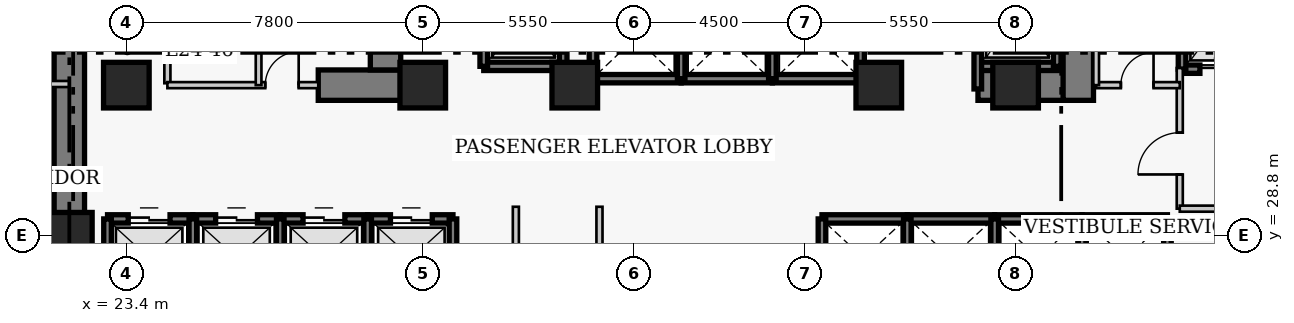
"""IFC4 building model, lengths in metres.
Left out: names, types, materials, properties, quantities, classifications, styles, units other than length and angle.
Written with IfcOpenShell. Run it as: python <this file> out.ifc"""

import sys

from ifc_helpers import new_model, si_unit, direction, frame, frame_2d, origin, origin_2d, place, context, subcontext, project, spatial, rectangle, extrude, element, fill, save


model = new_model("IFC4")
c1 = context("Model", 3, precision=1e-05, world=origin(), true_north=direction((0.0, 1.0)))
c2 = subcontext(c1, "Body", "Model", "MODEL_VIEW")
j1 = project(units=[si_unit("LENGTHUNIT", "METRE"), si_unit("PLANEANGLEUNIT", "RADIAN")], contexts=[c1])
p1 = place(None, origin())
s1 = spatial("IfcSite", under=j1, at=p1, CompositionType="ELEMENT")
p2 = place(p1, origin())
s2 = spatial("IfcBuilding", under=s1, at=p2, CompositionType="ELEMENT")
p3 = place(p2, frame((0.0, 0.0, 99.4)))
s3 = spatial("IfcBuildingStorey", under=s2, at=p3, CompositionType="ELEMENT", Elevation=99.4)
p4 = place(p3, frame((21.9, 27.05, 0.0), z_axis=(0.0, 0.0, 1.0), x_axis=(0.0, 1.0, 0.0)))
e1 = element("IfcWall", 1, at=p4, inside=s3, PredefinedType="SHEAR", context=c2, shape_type="SweptSolid", body=[
    extrude(rectangle(XDim=13.67, YDim=0.8, at=frame_2d((6.835, 0.0))), origin(), (0.0, 0.0, 1.0), 3.8),
])
p5 = place(p3, frame((28.45, 32.75, 0.0), z_axis=(0.0, 0.0, 1.0), x_axis=(1.0, 0.0, 0.0)))
e2 = element("IfcWall", 2, at=p5, inside=s3, PredefinedType="SHEAR", context=c2, shape_type="SweptSolid", body=[
    extrude(rectangle(XDim=2.4, YDim=0.8, at=frame_2d((1.2, 0.0))), origin(), (0.0, 0.0, 1.0), 3.8),
])
p6 = place(p3, frame((45.81, 32.75, 0.0), z_axis=(0.0, 0.0, 1.0), x_axis=(1.0, 0.0, 0.0)))
e3 = element("IfcWall", 3, at=p6, inside=s3, PredefinedType="SHEAR", context=c2, shape_type="SweptSolid", body=[
    extrude(rectangle(XDim=2.64, YDim=0.8, at=frame_2d((1.32, 0.0))), origin(), (0.0, 0.0, 1.0), 3.8),
])
p7 = place(p3, frame((30.22, 33.15, 0.0), z_axis=(0.0, 0.0, 1.0), x_axis=(0.0, 1.0, 0.0)))
e4 = element("IfcWall", 4, at=p7, inside=s3, PredefinedType="SHEAR", context=c2, shape_type="SweptSolid", body=[
    extrude(rectangle(XDim=7.17, YDim=0.8, at=frame_2d((3.585, 0.0))), origin(), (0.0, 0.0, 1.0), 3.8),
])
p8 = place(p3, frame((48.45, 32.35, 0.0), z_axis=(0.0, 0.0, 1.0), x_axis=(0.0, 1.0, 0.0)))
e5 = element("IfcWall", 5, at=p8, inside=s3, PredefinedType="SHEAR", context=c2, shape_type="SweptSolid", body=[
    extrude(rectangle(XDim=7.97, YDim=0.8, at=frame_2d((3.985, 0.0))), origin(), (0.0, 0.0, 1.0), 3.8),
])
p9 = place(p8, frame((5.85, 0.0, 0.0)))
e6 = element("IfcOpeningElement", 6, at=p9, cuts=e5, PredefinedType="OPENING", context=c2, shape_type="SweptSolid", body=[
    extrude(rectangle(XDim=1.1, YDim=2.15, at=frame_2d((0.55, 1.075))), frame((0.0, 0.41, 0.0), z_axis=(0.0, -1.0, 0.0), x_axis=(1.0, 0.0, 0.0)), (0.0, 0.0, 1.0), 0.82),
])
for number, where, z_axis, x_axis in (
    (7, (21.9, 28.8, 0.0), (0.0, 0.0, 1.0), (1.0, 0.0, 0.0)),
    (8, (23.4, 32.75, 0.0), (0.0, 0.0, 1.0), (1.0, 0.0, 0.0)),
    (9, (31.2, 32.75, 0.0), (0.0, 0.0, 1.0), (1.0, 0.0, 0.0)),
    (10, (35.2, 32.75, 0.0), (0.0, 0.0, 1.0), (1.0, 0.0, 0.0)),
    (11, (43.2, 32.75, 0.0), (0.0, 0.0, 1.0), (1.0, 0.0, 0.0)),
    (12, (46.8, 32.75, 0.0), (0.0, 0.0, 1.0), (1.0, 0.0, 0.0)),
):
    element("IfcColumn", number, at=place(p3, frame(where, z_axis=z_axis, x_axis=x_axis)), inside=s3, PredefinedType="COLUMN", context=c2, shape_type="SweptSolid", body=[
        extrude(rectangle(XDim=1.2, YDim=1.2, at=origin_2d()), origin(), (0.0, 0.0, 1.0), 3.8),
    ])
p10 = place(p3, frame((22.905, 29.23, 0.0), z_axis=(0.0, 0.0, 1.0), x_axis=(1.0, 0.0, 0.0)))
e13 = element("IfcWall", 13, at=p10, inside=s3, PredefinedType="SHEAR", context=c2, shape_type="SweptSolid", body=[
    extrude(rectangle(XDim=2.245, YDim=0.22, at=frame_2d((1.123, 0.0))), origin(), (0.0, 0.0, 1.0), 3.8),
])
p11 = place(p10, frame((0.545, 0.0, 0.0)))
e14 = element("IfcOpeningElement", 14, at=p11, cuts=e13, PredefinedType="OPENING", context=c2, shape_type="SweptSolid", body=[
    extrude(rectangle(XDim=1.1, YDim=2.15, at=frame_2d((0.55, 1.075))), frame((0.0, 0.12, 0.0), z_axis=(0.0, -1.0, 0.0), x_axis=(1.0, 0.0, 0.0)), (0.0, 0.0, 1.0), 0.24),
])
p12 = place(p3, frame((22.905, 27.17, 0.0), z_axis=(0.0, 0.0, 1.0), x_axis=(0.0, 1.0, 0.0)))
e15 = element("IfcWall", 15, at=p12, inside=s3, PredefinedType="SHEAR", context=c2, shape_type="SweptSolid", body=[
    extrude(rectangle(XDim=2.06, YDim=0.2, at=frame_2d((1.03, 0.0))), origin(), (0.0, 0.0, 1.0), 3.8),
])
p13 = place(p3, frame((25.15, 29.23, 0.0), z_axis=(0.0, 0.0, 1.0), x_axis=(1.0, 0.0, 0.0)))
e16 = element("IfcWall", 16, at=p13, inside=s3, PredefinedType="SHEAR", context=c2, shape_type="SweptSolid", body=[
    extrude(rectangle(XDim=2.3, YDim=0.22, at=frame_2d((1.15, 0.0))), origin(), (0.0, 0.0, 1.0), 3.8),
])
p14 = place(p13, frame((0.6, 0.0, 0.0)))
e17 = element("IfcOpeningElement", 17, at=p14, cuts=e16, PredefinedType="OPENING", context=c2, shape_type="SweptSolid", body=[
    extrude(rectangle(XDim=1.1, YDim=2.15, at=frame_2d((0.55, 1.075))), frame((0.0, 0.12, 0.0), z_axis=(0.0, -1.0, 0.0), x_axis=(1.0, 0.0, 0.0)), (0.0, 0.0, 1.0), 0.24),
])
p15 = place(p3, frame((25.15, 27.17, 0.0), z_axis=(0.0, 0.0, 1.0), x_axis=(0.0, 1.0, 0.0)))
e18 = element("IfcWall", 18, at=p15, inside=s3, PredefinedType="SHEAR", context=c2, shape_type="SweptSolid", body=[
    extrude(rectangle(XDim=2.06, YDim=0.2, at=frame_2d((1.03, 0.0))), origin(), (0.0, 0.0, 1.0), 3.8),
])
p16 = place(p3, frame((27.45, 29.23, 0.0), z_axis=(0.0, 0.0, 1.0), x_axis=(1.0, 0.0, 0.0)))
e19 = element("IfcWall", 19, at=p16, inside=s3, PredefinedType="SHEAR", context=c2, shape_type="SweptSolid", body=[
    extrude(rectangle(XDim=2.3, YDim=0.22, at=frame_2d((1.15, 0.0))), origin(), (0.0, 0.0, 1.0), 3.8),
])
p17 = place(p16, frame((0.6, 0.0, 0.0)))
e20 = element("IfcOpeningElement", 20, at=p17, cuts=e19, PredefinedType="OPENING", context=c2, shape_type="SweptSolid", body=[
    extrude(rectangle(XDim=1.1, YDim=2.15, at=frame_2d((0.55, 1.075))), frame((0.0, 0.12, 0.0), z_axis=(0.0, -1.0, 0.0), x_axis=(1.0, 0.0, 0.0)), (0.0, 0.0, 1.0), 0.24),
])
p18 = place(p3, frame((27.45, 27.17, 0.0), z_axis=(0.0, 0.0, 1.0), x_axis=(0.0, 1.0, 0.0)))
e21 = element("IfcWall", 21, at=p18, inside=s3, PredefinedType="SHEAR", context=c2, shape_type="SweptSolid", body=[
    extrude(rectangle(XDim=2.06, YDim=0.2, at=frame_2d((1.03, 0.0))), origin(), (0.0, 0.0, 1.0), 3.8),
])
p19 = place(p3, frame((29.75, 29.23, 0.0), z_axis=(0.0, 0.0, 1.0), x_axis=(1.0, 0.0, 0.0)))
e22 = element("IfcWall", 22, at=p19, inside=s3, PredefinedType="SHEAR", context=c2, shape_type="SweptSolid", body=[
    extrude(rectangle(XDim=2.245, YDim=0.22, at=frame_2d((1.123, 0.0))), origin(), (0.0, 0.0, 1.0), 3.8),
])
p20 = place(p19, frame((0.6, 0.0, 0.0)))
e23 = element("IfcOpeningElement", 23, at=p20, cuts=e22, PredefinedType="OPENING", context=c2, shape_type="SweptSolid", body=[
    extrude(rectangle(XDim=1.1, YDim=2.15, at=frame_2d((0.55, 1.075))), frame((0.0, 0.12, 0.0), z_axis=(0.0, -1.0, 0.0), x_axis=(1.0, 0.0, 0.0)), (0.0, 0.0, 1.0), 0.24),
])
for number, where, z_axis, x_axis in (
    (24, (29.75, 27.17, 0.0), (0.0, 0.0, 1.0), (0.0, 1.0, 0.0)),
    (25, (31.995, 27.17, 0.0), (0.0, 0.0, 1.0), (0.0, 1.0, 0.0)),
):
    element("IfcWall", number, at=place(p3, frame(where, z_axis=z_axis, x_axis=x_axis)), inside=s3, PredefinedType="SHEAR", context=c2, shape_type="SweptSolid", body=[
        extrude(rectangle(XDim=2.06, YDim=0.2, at=frame_2d((1.03, 0.0))), origin(), (0.0, 0.0, 1.0), 3.8),
    ])
p21 = place(p3, frame((41.705, 29.23, 0.0), z_axis=(0.0, 0.0, 1.0), x_axis=(1.0, 0.0, 0.0)))
e26 = element("IfcWall", 26, at=p21, inside=s3, PredefinedType="SHEAR", context=c2, shape_type="SweptSolid", body=[
    extrude(rectangle(XDim=2.245, YDim=0.22, at=frame_2d((1.123, 0.0))), origin(), (0.0, 0.0, 1.0), 3.8),
])
p22 = place(p3, frame((41.705, 27.17, 0.0), z_axis=(0.0, 0.0, 1.0), x_axis=(0.0, 1.0, 0.0)))
e27 = element("IfcWall", 27, at=p22, inside=s3, PredefinedType="SHEAR", context=c2, shape_type="SweptSolid", body=[
    extrude(rectangle(XDim=2.06, YDim=0.2, at=frame_2d((1.03, 0.0))), origin(), (0.0, 0.0, 1.0), 3.8),
])
p23 = place(p3, frame((43.95, 29.23, 0.0), z_axis=(0.0, 0.0, 1.0), x_axis=(1.0, 0.0, 0.0)))
e28 = element("IfcWall", 28, at=p23, inside=s3, PredefinedType="SHEAR", context=c2, shape_type="SweptSolid", body=[
    extrude(rectangle(XDim=2.3, YDim=0.22, at=frame_2d((1.15, 0.0))), origin(), (0.0, 0.0, 1.0), 3.8),
])
p24 = place(p3, frame((43.95, 27.17, 0.0), z_axis=(0.0, 0.0, 1.0), x_axis=(0.0, 1.0, 0.0)))
e29 = element("IfcWall", 29, at=p24, inside=s3, PredefinedType="SHEAR", context=c2, shape_type="SweptSolid", body=[
    extrude(rectangle(XDim=2.06, YDim=0.2, at=frame_2d((1.03, 0.0))), origin(), (0.0, 0.0, 1.0), 3.8),
])
p25 = place(p3, frame((46.25, 29.23, 0.0), z_axis=(0.0, 0.0, 1.0), x_axis=(1.0, 0.0, 0.0)))
e30 = element("IfcWall", 30, at=p25, inside=s3, PredefinedType="SHEAR", context=c2, shape_type="SweptSolid", body=[
    extrude(rectangle(XDim=2.3, YDim=0.22, at=frame_2d((1.15, 0.0))), origin(), (0.0, 0.0, 1.0), 3.8),
])
p26 = place(p3, frame((46.25, 27.17, 0.0), z_axis=(0.0, 0.0, 1.0), x_axis=(0.0, 1.0, 0.0)))
e31 = element("IfcWall", 31, at=p26, inside=s3, PredefinedType="SHEAR", context=c2, shape_type="SweptSolid", body=[
    extrude(rectangle(XDim=2.06, YDim=0.2, at=frame_2d((1.03, 0.0))), origin(), (0.0, 0.0, 1.0), 3.8),
])
p27 = place(p3, frame((48.55, 29.23, 0.0), z_axis=(0.0, 0.0, 1.0), x_axis=(1.0, 0.0, 0.0)))
e32 = element("IfcWall", 32, at=p27, inside=s3, PredefinedType="SHEAR", context=c2, shape_type="SweptSolid", body=[
    extrude(rectangle(XDim=2.245, YDim=0.22, at=frame_2d((1.123, 0.0))), origin(), (0.0, 0.0, 1.0), 3.8),
])
for number, where, z_axis, x_axis in (
    (33, (48.55, 27.17, 0.0), (0.0, 0.0, 1.0), (0.0, 1.0, 0.0)),
    (34, (50.795, 27.17, 0.0), (0.0, 0.0, 1.0), (0.0, 1.0, 0.0)),
):
    element("IfcWall", number, at=place(p3, frame(where, z_axis=z_axis, x_axis=x_axis)), inside=s3, PredefinedType="SHEAR", context=c2, shape_type="SweptSolid", body=[
        extrude(rectangle(XDim=2.06, YDim=0.2, at=frame_2d((1.03, 0.0))), origin(), (0.0, 0.0, 1.0), 3.8),
    ])
p28 = place(p3, frame((35.68, 32.92, 0.0), z_axis=(0.0, 0.0, 1.0), x_axis=(1.0, 0.0, 0.0)))
e35 = element("IfcWall", 35, at=p28, inside=s3, PredefinedType="SHEAR", context=c2, shape_type="SweptSolid", body=[
    extrude(rectangle(XDim=2.32, YDim=0.22, at=frame_2d((1.16, 0.0))), origin(), (0.0, 0.0, 1.0), 3.8),
])
p29 = place(p3, frame((35.68, 32.92, 0.0), z_axis=(0.0, 0.0, 1.0), x_axis=(0.0, 1.0, 0.0)))
e36 = element("IfcWall", 36, at=p29, inside=s3, PredefinedType="SHEAR", context=c2, shape_type="SweptSolid", body=[
    extrude(rectangle(XDim=2.16, YDim=0.2, at=frame_2d((1.08, 0.0))), origin(), (0.0, 0.0, 1.0), 3.8),
])
p30 = place(p3, frame((38.0, 32.92, 0.0), z_axis=(0.0, 0.0, 1.0), x_axis=(1.0, 0.0, 0.0)))
e37 = element("IfcWall", 37, at=p30, inside=s3, PredefinedType="SHEAR", context=c2, shape_type="SweptSolid", body=[
    extrude(rectangle(XDim=2.4, YDim=0.22, at=frame_2d((1.2, 0.0))), origin(), (0.0, 0.0, 1.0), 3.8),
])
p31 = place(p3, frame((38.0, 32.92, 0.0), z_axis=(0.0, 0.0, 1.0), x_axis=(0.0, 1.0, 0.0)))
e38 = element("IfcWall", 38, at=p31, inside=s3, PredefinedType="SHEAR", context=c2, shape_type="SweptSolid", body=[
    extrude(rectangle(XDim=2.16, YDim=0.2, at=frame_2d((1.08, 0.0))), origin(), (0.0, 0.0, 1.0), 3.8),
])
p32 = place(p3, frame((40.4, 32.92, 0.0), z_axis=(0.0, 0.0, 1.0), x_axis=(1.0, 0.0, 0.0)))
e39 = element("IfcWall", 39, at=p32, inside=s3, PredefinedType="SHEAR", context=c2, shape_type="SweptSolid", body=[
    extrude(rectangle(XDim=2.32, YDim=0.22, at=frame_2d((1.16, 0.0))), origin(), (0.0, 0.0, 1.0), 3.8),
])
for number, where, z_axis, x_axis in (
    (40, (40.4, 32.92, 0.0), (0.0, 0.0, 1.0), (0.0, 1.0, 0.0)),
    (41, (42.72, 32.92, 0.0), (0.0, 0.0, 1.0), (0.0, 1.0, 0.0)),
):
    element("IfcWall", number, at=place(p3, frame(where, z_axis=z_axis, x_axis=x_axis)), inside=s3, PredefinedType="SHEAR", context=c2, shape_type="SweptSolid", body=[
        extrude(rectangle(XDim=2.16, YDim=0.2, at=frame_2d((1.08, 0.0))), origin(), (0.0, 0.0, 1.0), 3.8),
    ])
p33 = place(p3, frame((51.18, 33.17, 0.0), z_axis=(0.0, 0.0, 1.0), x_axis=(1.0, 0.0, 0.0)))
e42 = element("IfcWall", 42, at=p33, inside=s3, PredefinedType="SHEAR", context=c2, shape_type="SweptSolid", body=[
    extrude(rectangle(XDim=2.42, YDim=0.22, at=frame_2d((1.21, 0.0))), origin(), (0.0, 0.0, 1.0), 3.8),
])
p34 = place(p33, frame((0.47, 0.0, 0.0)))
e43 = element("IfcOpeningElement", 43, at=p34, cuts=e42, PredefinedType="OPENING", context=c2, shape_type="SweptSolid", body=[
    extrude(rectangle(XDim=1.3, YDim=2.15, at=frame_2d((0.65, 1.075))), frame((0.0, 0.12, 0.0), z_axis=(0.0, -1.0, 0.0), x_axis=(1.0, 0.0, 0.0)), (0.0, 0.0, 1.0), 0.24),
])
p35 = place(p3, frame((51.18, 33.17, 0.0), z_axis=(0.0, 0.0, 1.0), x_axis=(0.0, 1.0, 0.0)))
e44 = element("IfcWall", 44, at=p35, inside=s3, PredefinedType="SHEAR", context=c2, shape_type="SweptSolid", body=[
    extrude(rectangle(XDim=2.86, YDim=0.2, at=frame_2d((1.43, 0.0))), origin(), (0.0, 0.0, 1.0), 3.8),
])
p36 = place(p3, frame((32.805, 33.245, 0.0), z_axis=(0.0, 0.0, 1.0), x_axis=(1.0, 0.0, 0.0)))
e45 = element("IfcWall", 45, at=p36, inside=s3, PredefinedType="SHEAR", context=c2, shape_type="SweptSolid", body=[
    extrude(rectangle(XDim=2.09, YDim=0.22, at=frame_2d((1.045, 0.0))), origin(), (0.0, 0.0, 1.0), 3.8),
])
for number, where, z_axis, x_axis in (
    (46, (32.805, 33.245, 0.0), (0.0, 0.0, 1.0), (0.0, 1.0, 0.0)),
    (47, (34.895, 33.245, 0.0), (0.0, 0.0, 1.0), (0.0, 1.0, 0.0)),
):
    element("IfcWall", number, at=place(p3, frame(where, z_axis=z_axis, x_axis=x_axis)), inside=s3, PredefinedType="SHEAR", context=c2, shape_type="SweptSolid", body=[
        extrude(rectangle(XDim=2.91, YDim=0.2, at=frame_2d((1.455, 0.0))), origin(), (0.0, 0.0, 1.0), 3.8),
    ])
p37 = place(p3, frame((45.805, 33.245, 0.0), z_axis=(0.0, 0.0, 1.0), x_axis=(1.0, 0.0, 0.0)))
e48 = element("IfcWall", 48, at=p37, inside=s3, PredefinedType="SHEAR", context=c2, shape_type="SweptSolid", body=[
    extrude(rectangle(XDim=2.09, YDim=0.22, at=frame_2d((1.045, 0.0))), origin(), (0.0, 0.0, 1.0), 3.8),
])
p38 = place(p3, frame((45.805, 32.65, 0.0), z_axis=(0.0, 0.0, 1.0), x_axis=(0.0, 1.0, 0.0)))
e49 = element("IfcWall", 49, at=p38, inside=s3, PredefinedType="SHEAR", context=c2, shape_type="SweptSolid", body=[
    extrude(rectangle(XDim=3.505, YDim=0.2, at=frame_2d((1.752, 0.0))), origin(), (0.0, 0.0, 1.0), 3.8),
])
p39 = place(p3, frame((47.895, 33.245, 0.0), z_axis=(0.0, 0.0, 1.0), x_axis=(0.0, 1.0, 0.0)))
e50 = element("IfcWall", 50, at=p39, inside=s3, PredefinedType="SHEAR", context=c2, shape_type="SweptSolid", body=[
    extrude(rectangle(XDim=2.91, YDim=0.2, at=frame_2d((1.455, 0.0))), origin(), (0.0, 0.0, 1.0), 3.8),
])
p40 = place(p3, frame((24.48, 32.8, 0.0), z_axis=(0.0, 0.0, 1.0), x_axis=(0.0, 1.0, 0.0)))
e51 = element("IfcWall", 51, at=p40, inside=s3, PredefinedType="PARTITIONING", context=c2, shape_type="SweptSolid", body=[
    extrude(rectangle(XDim=3.57, YDim=0.16, at=frame_2d((1.785, 0.0))), origin(), (0.0, 0.0, 1.0), 3.54),
])
p41 = place(p40, frame((1.604, 0.0, 0.0)))
e52 = element("IfcOpeningElement", 52, at=p41, cuts=e51, PredefinedType="OPENING", context=c2, shape_type="SweptSolid", body=[
    extrude(rectangle(XDim=0.9, YDim=2.1, at=frame_2d((0.45, 1.05))), frame((0.0, 0.09, 0.0), z_axis=(0.0, -1.0, 0.0), x_axis=(1.0, 0.0, 0.0)), (0.0, 0.0, 1.0), 0.18),
])
p42 = place(p3, frame((51.12, 29.5, 0.0), z_axis=(0.0, 0.0, 1.0), x_axis=(0.0, 1.0, 0.0)))
e53 = element("IfcWall", 53, at=p42, inside=s3, PredefinedType="PARTITIONING", context=c2, shape_type="SweptSolid", body=[
    extrude(rectangle(XDim=3.7, YDim=0.16, at=frame_2d((1.85, 0.0))), origin(), (0.0, 0.0, 1.0), 3.54),
])
p43 = place(p42, frame((0.9, 0.0, 0.0)))
e54 = element("IfcOpeningElement", 54, at=p43, cuts=e53, PredefinedType="OPENING", context=c2, shape_type="SweptSolid", body=[
    extrude(rectangle(XDim=1.1, YDim=2.15, at=frame_2d((0.55, 1.075))), frame((0.0, 0.09, 0.0), z_axis=(0.0, -1.0, 0.0), x_axis=(1.0, 0.0, 0.0)), (0.0, 0.0, 1.0), 0.18),
])
p44 = place(p3, frame((51.12, 29.5, 0.0), z_axis=(0.0, 0.0, 1.0), x_axis=(1.0, 0.0, 0.0)))
e55 = element("IfcWall", 55, at=p44, inside=s3, PredefinedType="PARTITIONING", context=c2, shape_type="SweptSolid", body=[
    extrude(rectangle(XDim=5.63, YDim=0.16, at=frame_2d((2.815, 0.0))), origin(), (0.0, 0.0, 1.0), 3.54),
])
p45 = place(p3, frame((24.48, 32.75, 0.0), z_axis=(0.0, 0.0, 1.0), x_axis=(1.0, 0.0, 0.0)))
e56 = element("IfcWall", 56, at=p45, inside=s3, PredefinedType="PARTITIONING", context=c2, shape_type="SweptSolid", body=[
    extrude(rectangle(XDim=3.97, YDim=0.16, at=frame_2d((1.985, 0.0))), origin(), (0.0, 0.0, 1.0), 3.54),
])
p46 = place(p45, frame((2.575, 0.0, 0.0)))
e57 = element("IfcOpeningElement", 57, at=p46, cuts=e56, PredefinedType="OPENING", context=c2, shape_type="SweptSolid", body=[
    extrude(rectangle(XDim=0.88, YDim=2.05, at=frame_2d((0.44, 1.025))), frame((0.0, 0.09, 0.0), z_axis=(0.0, -1.0, 0.0), x_axis=(1.0, 0.0, 0.0)), (0.0, 0.0, 1.0), 0.18),
])
p47 = place(p3, frame((48.92, 32.75, 0.0), z_axis=(0.0, 0.0, 1.0), x_axis=(1.0, 0.0, 0.0)))
e58 = element("IfcWall", 58, at=p47, inside=s3, PredefinedType="PARTITIONING", context=c2, shape_type="SweptSolid", body=[
    extrude(rectangle(XDim=2.2, YDim=0.16, at=frame_2d((1.1, 0.0))), origin(), (0.0, 0.0, 1.0), 3.54),
])
p48 = place(p47, frame((0.65, 0.0, 0.0)))
e59 = element("IfcOpeningElement", 59, at=p48, cuts=e58, PredefinedType="OPENING", context=c2, shape_type="SweptSolid", body=[
    extrude(rectangle(XDim=0.86, YDim=2.05, at=frame_2d((0.43, 1.025))), frame((0.0, 0.09, 0.0), z_axis=(0.0, -1.0, 0.0), x_axis=(1.0, 0.0, 0.0)), (0.0, 0.0, 1.0), 0.18),
])
for number, where, z_axis, x_axis in (
    (60, (48.92, 32.75, 0.0), (0.0, 0.0, 1.0), (0.0, 1.0, 0.0)),
    (61, (26.88, 32.75, 0.0), (0.0, 0.0, 1.0), (0.0, 1.0, 0.0)),
):
    element("IfcWall", number, at=place(p3, frame(where, z_axis=z_axis, x_axis=x_axis)), inside=s3, PredefinedType="PARTITIONING", context=c2, shape_type="SweptSolid", body=[
        extrude(rectangle(XDim=3.62, YDim=0.15, at=frame_2d((1.81, 0.0))), origin(), (0.0, 0.0, 1.0), 3.54),
    ])
for number, where, z_axis, x_axis in (
    (62, (33.65, 24.66, 0.0), (0.0, 0.0, 1.0), (0.0, 1.0, 0.0)),
    (63, (35.85, 24.66, 0.0), (0.0, 0.0, 1.0), (0.0, 1.0, 0.0)),
):
    element("IfcWall", number, at=place(p3, frame(where, z_axis=z_axis, x_axis=x_axis)), inside=s3, PredefinedType="PARTITIONING", context=c2, shape_type="SweptSolid", body=[
        extrude(rectangle(XDim=4.89, YDim=0.16, at=frame_2d((2.445, 0.0))), origin(), (0.0, 0.0, 1.0), 3.54),
    ])
p49 = place(p3, frame((19.41, 32.78, 0.0), z_axis=(0.0, 0.0, 1.0), x_axis=(1.0, 0.0, 0.0)))
e64 = element("IfcWall", 64, at=p49, inside=s3, PredefinedType="PARTITIONING", context=c2, shape_type="SweptSolid", body=[
    extrude(rectangle(XDim=2.49, YDim=0.16, at=frame_2d((1.245, 0.0))), origin(), (0.0, 0.0, 1.0), 3.54),
])
p50 = place(p11, origin())
e65 = element("IfcDoor", 65, at=p50, inside=s3, OperationType="DOUBLE_DOOR_SLIDING", PredefinedType="DOOR", context=c2, shape_type="SweptSolid", body=[
    extrude(rectangle(XDim=1.1, YDim=2.15, at=frame_2d((0.55, 1.075))), frame((0.0, 0.025, 0.0), z_axis=(0.0, -1.0, 0.0), x_axis=(1.0, 0.0, 0.0)), (0.0, 0.0, 1.0), 0.05),
])
fill(e14, e65)
p51 = place(p14, origin())
e66 = element("IfcDoor", 66, at=p51, inside=s3, OperationType="DOUBLE_DOOR_SLIDING", PredefinedType="DOOR", context=c2, shape_type="SweptSolid", body=[
    extrude(rectangle(XDim=1.1, YDim=2.15, at=frame_2d((0.55, 1.075))), frame((0.0, 0.025, 0.0), z_axis=(0.0, -1.0, 0.0), x_axis=(1.0, 0.0, 0.0)), (0.0, 0.0, 1.0), 0.05),
])
fill(e17, e66)
p52 = place(p17, origin())
e67 = element("IfcDoor", 67, at=p52, inside=s3, OperationType="DOUBLE_DOOR_SLIDING", PredefinedType="DOOR", context=c2, shape_type="SweptSolid", body=[
    extrude(rectangle(XDim=1.1, YDim=2.15, at=frame_2d((0.55, 1.075))), frame((0.0, 0.025, 0.0), z_axis=(0.0, -1.0, 0.0), x_axis=(1.0, 0.0, 0.0)), (0.0, 0.0, 1.0), 0.05),
])
fill(e20, e67)
p53 = place(p20, origin())
e68 = element("IfcDoor", 68, at=p53, inside=s3, OperationType="DOUBLE_DOOR_SLIDING", PredefinedType="DOOR", context=c2, shape_type="SweptSolid", body=[
    extrude(rectangle(XDim=1.1, YDim=2.15, at=frame_2d((0.55, 1.075))), frame((0.0, 0.025, 0.0), z_axis=(0.0, -1.0, 0.0), x_axis=(1.0, 0.0, 0.0)), (0.0, 0.0, 1.0), 0.05),
])
fill(e23, e68)
p54 = place(p34, origin())
e69 = element("IfcDoor", 69, at=p54, inside=s3, OperationType="DOUBLE_DOOR_SLIDING", PredefinedType="DOOR", context=c2, shape_type="SweptSolid", body=[
    extrude(rectangle(XDim=1.3, YDim=2.15, at=frame_2d((0.65, 1.075))), frame((0.0, 0.025, 0.0), z_axis=(0.0, -1.0, 0.0), x_axis=(1.0, 0.0, 0.0)), (0.0, 0.0, 1.0), 0.05),
])
fill(e43, e69)
p55 = place(p43, origin())
e70 = element("IfcDoor", 70, at=p55, inside=s3, OperationType="SINGLE_SWING_LEFT", PredefinedType="DOOR", context=c2, shape_type="SweptSolid", body=[
    extrude(rectangle(XDim=1.1, YDim=2.15, at=frame_2d((0.55, 1.075))), frame((0.0, 0.025, 0.0), z_axis=(0.0, -1.0, 0.0), x_axis=(1.0, 0.0, 0.0)), (0.0, 0.0, 1.0), 0.05),
])
fill(e54, e70)
p56 = place(p46, origin())
e71 = element("IfcDoor", 71, at=p56, inside=s3, OperationType="SINGLE_SWING_RIGHT", PredefinedType="DOOR", context=c2, shape_type="SweptSolid", body=[
    extrude(rectangle(XDim=0.88, YDim=2.05, at=frame_2d((0.44, 1.025))), frame((0.0, 0.025, 0.0), z_axis=(0.0, -1.0, 0.0), x_axis=(1.0, 0.0, 0.0)), (0.0, 0.0, 1.0), 0.05),
])
fill(e57, e71)
p57 = place(p48, origin())
e72 = element("IfcDoor", 72, at=p57, inside=s3, OperationType="SINGLE_SWING_RIGHT", PredefinedType="DOOR", context=c2, shape_type="SweptSolid", body=[
    extrude(rectangle(XDim=0.86, YDim=2.05, at=frame_2d((0.43, 1.025))), frame((0.0, 0.025, 0.0), z_axis=(0.0, -1.0, 0.0), x_axis=(1.0, 0.0, 0.0)), (0.0, 0.0, 1.0), 0.05),
])
fill(e59, e72)
save(model, sys.argv[1])
